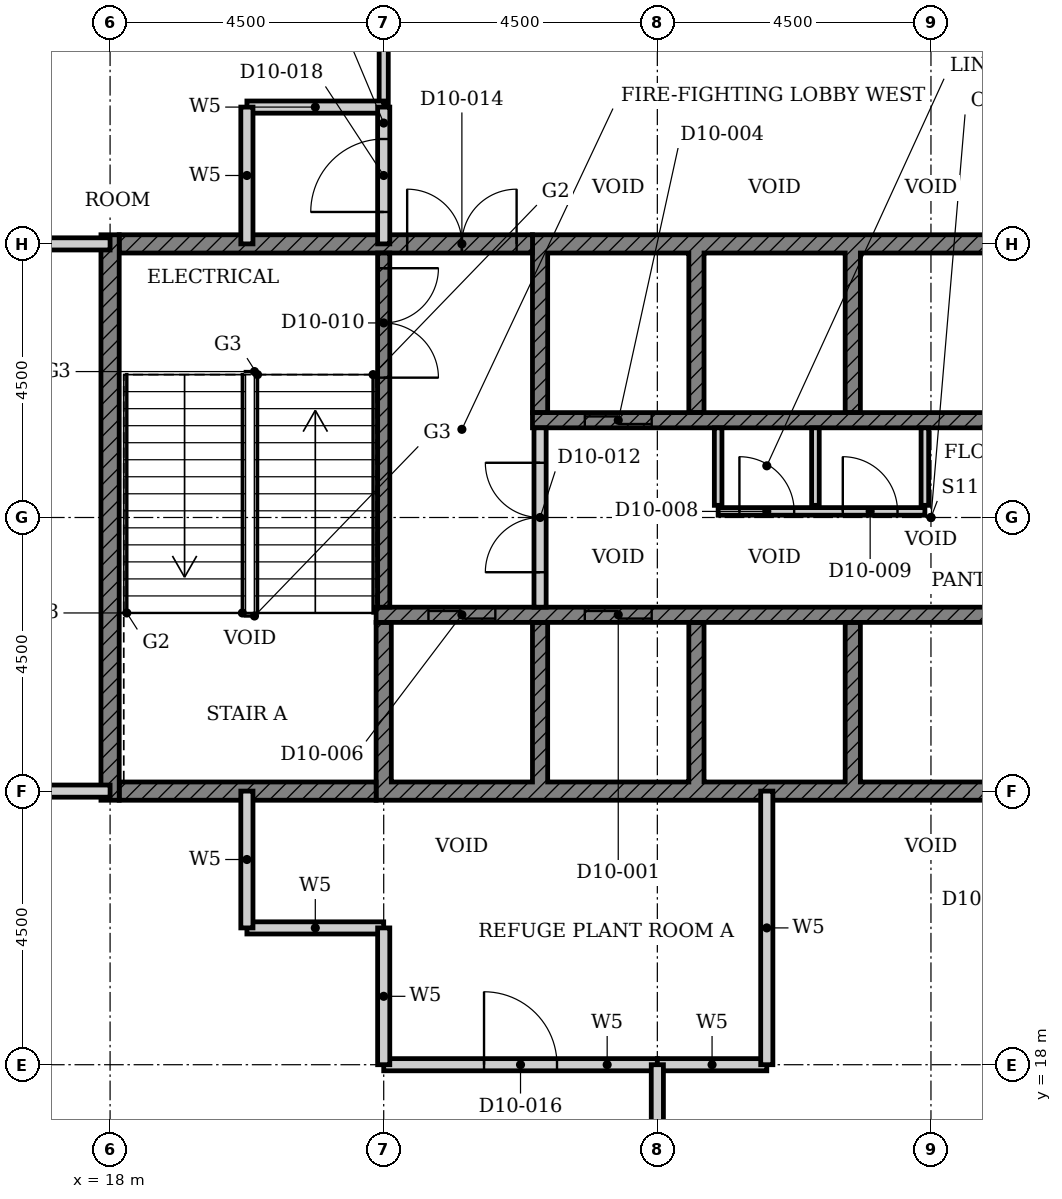
"""IFC4 building model, lengths in metres.
Left out: names, types, materials, properties, quantities, classifications, styles, units other than length and angle.
Written with IfcOpenShell. Run it as: python <this file> out.ifc"""

import sys

from ifc_helpers import new_model, si_unit, direction, frame, frame_2d, origin, place, context, subcontext, project, spatial, polyline, rectangle, outline, extrude, element, fill, save


model = new_model("IFC4")
c1 = context("Model", 3, precision=1e-05, world=origin(), true_north=direction((0.0, 1.0)))
c2 = subcontext(c1, "Body", "Model", "MODEL_VIEW")
j1 = project(units=[si_unit("LENGTHUNIT", "METRE"), si_unit("PLANEANGLEUNIT", "RADIAN")], contexts=[c1])
p1 = place(None, origin())
s1 = spatial("IfcSite", under=j1, at=p1, CompositionType="ELEMENT")
p2 = place(p1, origin())
s2 = spatial("IfcBuilding", under=s1, at=p2, CompositionType="ELEMENT")
p3 = place(p2, frame((0.0, 0.0, 48.0)))
s3 = spatial("IfcBuildingStorey", under=s2, at=p3, CompositionType="ELEMENT", Elevation=48.0)
p4 = place(p3, origin())
e1 = element("IfcWall", 1, at=p4, inside=s3, PredefinedType="SHEAR", context=c2, shape_type="SweptSolid", body=[
    extrude(outline(polyline([(22.375, 22.35), (38.053, 22.35), (38.053, 25.275), (37.803, 25.275), (37.803, 22.65), (35.482, 22.65), (35.482, 25.275), (35.232, 25.275), (35.232, 22.65), (32.911, 22.65), (32.911, 25.275), (32.661, 25.275), (32.661, 22.65), (30.339, 22.65), (30.339, 25.275), (30.089, 25.275), (30.089, 22.65), (27.768, 22.65), (27.768, 25.275), (27.518, 25.275), (27.518, 22.65), (25.197, 22.65), (25.197, 25.275), (24.947, 25.275), (24.947, 22.65), (22.625, 22.65), (22.625, 25.275), (22.375, 25.275), (22.375, 22.35)])), origin(), (0.0, 0.0, 1.0), 4.5),
])
p5 = place(p3, origin())
e2 = element("IfcWall", 2, at=p5, inside=s3, PredefinedType="SHEAR", context=c2, shape_type="SweptSolid", body=[
    extrude(outline(polyline([(24.947, 28.725), (25.197, 28.725), (25.197, 31.35), (27.518, 31.35), (27.518, 28.725), (27.768, 28.725), (27.768, 31.35), (30.089, 31.35), (30.089, 28.725), (30.339, 28.725), (30.339, 31.35), (32.661, 31.35), (32.661, 28.725), (32.911, 28.725), (32.911, 31.35), (35.232, 31.35), (35.232, 28.725), (35.482, 28.725), (35.482, 31.35), (37.803, 31.35), (37.803, 28.725), (38.053, 28.725), (38.053, 31.35), (40.375, 31.35), (40.375, 28.725), (40.625, 28.725), (40.625, 31.65), (24.947, 31.65), (24.947, 28.725)])), origin(), (0.0, 0.0, 1.0), 4.5),
])
p6 = place(p3, frame((18.15, 22.5, 0.0), z_axis=(0.0, 0.0, 1.0), x_axis=(1.0, 0.0, 0.0)))
e3 = element("IfcWall", 3, at=p6, inside=s3, PredefinedType="SHEAR", context=c2, shape_type="SweptSolid", body=[
    extrude(rectangle(XDim=4.225, YDim=0.3, at=frame_2d((2.113, 0.0))), origin(), (0.0, 0.0, 1.0), 4.5),
])
p7 = place(p3, frame((18.15, 31.5, 0.0), z_axis=(0.0, 0.0, 1.0), x_axis=(1.0, 0.0, 0.0)))
e4 = element("IfcWall", 4, at=p7, inside=s3, PredefinedType="SHEAR", context=c2, shape_type="SweptSolid", body=[
    extrude(rectangle(XDim=6.797, YDim=0.3, at=frame_2d((3.398, 0.0))), origin(), (0.0, 0.0, 1.0), 4.5),
])
p8 = place(p7, frame((4.736, 0.0, 0.0)))
e5 = element("IfcOpeningElement", 5, at=p8, cuts=e4, PredefinedType="OPENING", context=c2, shape_type="SweptSolid", body=[
    extrude(rectangle(XDim=1.8, YDim=2.1, at=frame_2d((0.9, 1.05))), frame((0.0, 0.16, 0.0), z_axis=(0.0, -1.0, 0.0), x_axis=(1.0, 0.0, 0.0)), (0.0, 0.0, 1.0), 0.32),
])
p9 = place(p3, frame((18.0, 22.35, 0.0), z_axis=(0.0, 0.0, 1.0), x_axis=(0.0, 1.0, 0.0)))
e6 = element("IfcWall", 6, at=p9, inside=s3, PredefinedType="SHEAR", context=c2, shape_type="SweptSolid", body=[
    extrude(rectangle(XDim=9.3, YDim=0.3, at=frame_2d((4.65, 0.0))), origin(), (0.0, 0.0, 1.0), 4.5),
])
p10 = place(p3, frame((22.375, 25.4, 0.0), z_axis=(0.0, 0.0, 1.0), x_axis=(1.0, 0.0, 0.0)))
e7 = element("IfcWall", 7, at=p10, inside=s3, PredefinedType="SHEAR", context=c2, shape_type="SweptSolid", body=[
    extrude(rectangle(XDim=15.678, YDim=0.25, at=frame_2d((7.839, 0.0))), origin(), (0.0, 0.0, 1.0), 4.5),
])
p11 = place(p10, frame((3.432, 0.0, 0.0)))
e8 = element("IfcOpeningElement", 8, at=p11, cuts=e7, PredefinedType="OPENING", context=c2, shape_type="SweptSolid", body=[
    extrude(rectangle(XDim=1.1, YDim=2.1, at=frame_2d((0.55, 1.05))), frame((0.0, 0.135, 0.0), z_axis=(0.0, -1.0, 0.0), x_axis=(1.0, 0.0, 0.0)), (0.0, 0.0, 1.0), 0.27),
])
p12 = place(p10, frame((11.146, 0.0, 0.0)))
e9 = element("IfcOpeningElement", 9, at=p12, cuts=e7, PredefinedType="OPENING", context=c2, shape_type="SweptSolid", body=[
    extrude(rectangle(XDim=1.1, YDim=2.1, at=frame_2d((0.55, 1.05))), frame((0.0, 0.135, 0.0), z_axis=(0.0, -1.0, 0.0), x_axis=(1.0, 0.0, 0.0)), (0.0, 0.0, 1.0), 0.27),
])
p13 = place(p10, frame((13.718, 0.0, 0.0)))
e10 = element("IfcOpeningElement", 10, at=p13, cuts=e7, PredefinedType="OPENING", context=c2, shape_type="SweptSolid", body=[
    extrude(rectangle(XDim=1.1, YDim=2.1, at=frame_2d((0.55, 1.05))), frame((0.0, 0.135, 0.0), z_axis=(0.0, -1.0, 0.0), x_axis=(1.0, 0.0, 0.0)), (0.0, 0.0, 1.0), 0.27),
])
p14 = place(p10, frame((0.861, 0.0, 0.0)))
e11 = element("IfcOpeningElement", 11, at=p14, cuts=e7, PredefinedType="OPENING", context=c2, shape_type="SweptSolid", body=[
    extrude(rectangle(XDim=1.1, YDim=2.1, at=frame_2d((0.55, 1.05))), frame((0.0, 0.135, 0.0), z_axis=(0.0, -1.0, 0.0), x_axis=(1.0, 0.0, 0.0)), (0.0, 0.0, 1.0), 0.27),
])
p15 = place(p3, frame((24.947, 28.6, 0.0), z_axis=(0.0, 0.0, 1.0), x_axis=(1.0, 0.0, 0.0)))
e12 = element("IfcWall", 12, at=p15, inside=s3, PredefinedType="SHEAR", context=c2, shape_type="SweptSolid", body=[
    extrude(rectangle(XDim=15.678, YDim=0.25, at=frame_2d((7.839, 0.0))), origin(), (0.0, 0.0, 1.0), 4.5),
])
p16 = place(p15, frame((0.861, 0.0, 0.0)))
e13 = element("IfcOpeningElement", 13, at=p16, cuts=e12, PredefinedType="OPENING", context=c2, shape_type="SweptSolid", body=[
    extrude(rectangle(XDim=1.1, YDim=2.1, at=frame_2d((0.55, 1.05))), frame((0.0, 0.135, 0.0), z_axis=(0.0, -1.0, 0.0), x_axis=(1.0, 0.0, 0.0)), (0.0, 0.0, 1.0), 0.27),
])
p17 = place(p15, frame((8.575, 0.0, 0.0)))
e14 = element("IfcOpeningElement", 14, at=p17, cuts=e12, PredefinedType="OPENING", context=c2, shape_type="SweptSolid", body=[
    extrude(rectangle(XDim=1.1, YDim=2.1, at=frame_2d((0.55, 1.05))), frame((0.0, 0.135, 0.0), z_axis=(0.0, -1.0, 0.0), x_axis=(1.0, 0.0, 0.0)), (0.0, 0.0, 1.0), 0.27),
])
p18 = place(p15, frame((13.718, 0.0, 0.0)))
e15 = element("IfcOpeningElement", 15, at=p18, cuts=e12, PredefinedType="OPENING", context=c2, shape_type="SweptSolid", body=[
    extrude(rectangle(XDim=1.1, YDim=2.1, at=frame_2d((0.55, 1.05))), frame((0.0, 0.135, 0.0), z_axis=(0.0, -1.0, 0.0), x_axis=(1.0, 0.0, 0.0)), (0.0, 0.0, 1.0), 0.27),
])
p19 = place(p3, frame((28.0, 27.1, 0.0), z_axis=(0.0, 0.0, 1.0), x_axis=(1.0, 0.0, 0.0)))
e16 = element("IfcWall", 16, at=p19, inside=s3, PredefinedType="PARTITIONING", context=c2, shape_type="SweptSolid", body=[
    extrude(rectangle(XDim=3.4, YDim=0.125, at=frame_2d((1.7, 0.0))), origin(), (0.0, 0.0, 1.0), 4.5),
])
p20 = place(p19, frame((0.35, 0.0, 0.0)))
e17 = element("IfcOpeningElement", 17, at=p20, cuts=e16, PredefinedType="OPENING", context=c2, shape_type="SweptSolid", body=[
    extrude(rectangle(XDim=0.9, YDim=2.1, at=frame_2d((0.45, 1.05))), frame((0.0, 0.073, 0.0), z_axis=(0.0, -1.0, 0.0), x_axis=(1.0, 0.0, 0.0)), (0.0, 0.0, 1.0), 0.145),
])
p21 = place(p19, frame((2.05, 0.0, 0.0)))
e18 = element("IfcOpeningElement", 18, at=p21, cuts=e16, PredefinedType="OPENING", context=c2, shape_type="SweptSolid", body=[
    extrude(rectangle(XDim=0.9, YDim=2.1, at=frame_2d((0.45, 1.05))), frame((0.0, 0.073, 0.0), z_axis=(0.0, -1.0, 0.0), x_axis=(1.0, 0.0, 0.0)), (0.0, 0.0, 1.0), 0.145),
])
for number, where, z_axis, x_axis in (
    (19, (28.0, 28.475, 0.0), (0.0, 0.0, 1.0), (0.0, -1.0, 0.0)),
    (20, (29.6, 28.475, 0.0), (0.0, 0.0, 1.0), (0.0, -1.0, 0.0)),
    (21, (31.4, 28.475, 0.0), (0.0, 0.0, 1.0), (0.0, -1.0, 0.0)),
):
    element("IfcWall", number, at=place(p3, frame(where, z_axis=z_axis, x_axis=x_axis)), inside=s3, PredefinedType="PARTITIONING", context=c2, shape_type="SweptSolid", body=[
        extrude(rectangle(XDim=1.275, YDim=0.125, at=frame_2d((0.638, 0.0))), origin(), (0.0, 0.0, 1.0), 4.5),
    ])
p22 = place(p3, frame((22.5, 31.35, 0.0), z_axis=(0.0, 0.0, 1.0), x_axis=(0.0, -1.0, 0.0)))
e22 = element("IfcWall", 22, at=p22, inside=s3, PredefinedType="SHEAR", context=c2, shape_type="SweptSolid", body=[
    extrude(rectangle(XDim=5.825, YDim=0.2, at=frame_2d((2.913, 0.0))), origin(), (0.0, 0.0, 1.0), 4.5),
])
p23 = place(p22, frame((0.25, 0.0, 0.0)))
e23 = element("IfcOpeningElement", 23, at=p23, cuts=e22, PredefinedType="OPENING", context=c2, shape_type="SweptSolid", body=[
    extrude(rectangle(XDim=1.8, YDim=2.1, at=frame_2d((0.9, 1.05))), frame((0.0, 0.11, 0.0), z_axis=(0.0, -1.0, 0.0), x_axis=(1.0, 0.0, 0.0)), (0.0, 0.0, 1.0), 0.22),
])
p24 = place(p3, frame((25.072, 25.525, 0.0), z_axis=(0.0, 0.0, 1.0), x_axis=(0.0, 1.0, 0.0)))
e24 = element("IfcWall", 24, at=p24, inside=s3, PredefinedType="PARTITIONING", context=c2, shape_type="SweptSolid", body=[
    extrude(rectangle(XDim=2.95, YDim=0.2, at=frame_2d((1.475, 0.0))), origin(), (0.0, 0.0, 1.0), 4.5),
])
p25 = place(p24, frame((0.575, 0.0, 0.0)))
e25 = element("IfcOpeningElement", 25, at=p25, cuts=e24, PredefinedType="OPENING", context=c2, shape_type="SweptSolid", body=[
    extrude(rectangle(XDim=1.8, YDim=2.1, at=frame_2d((0.9, 1.05))), frame((0.0, 0.11, 0.0), z_axis=(0.0, -1.0, 0.0), x_axis=(1.0, 0.0, 0.0)), (0.0, 0.0, 1.0), 0.22),
])
p26 = place(p3, frame((22.5, 33.75, 0.0), z_axis=(0.0, 0.0, 1.0), x_axis=(0.0, 1.0, 0.0)))
e26 = element("IfcWall", 26, at=p26, inside=s3, PredefinedType="PARTITIONING", context=c2, shape_type="SweptSolid", body=[
    extrude(rectangle(XDim=2.25, YDim=0.15, at=frame_2d((1.125, 0.0))), origin(), (0.0, 0.0, 1.0), 4.5),
])
p27 = place(p3, frame((22.5, 18.0, 0.0), z_axis=(0.0, 0.0, 1.0), x_axis=(1.0, 0.0, 0.0)))
e27 = element("IfcWall", 27, at=p27, inside=s3, PredefinedType="PARTITIONING", context=c2, shape_type="SweptSolid", body=[
    extrude(rectangle(XDim=4.5, YDim=0.2, at=frame_2d((2.25, 0.0))), origin(), (0.0, 0.0, 1.0), 4.5),
])
p28 = place(p27, frame((1.65, 0.0, 0.0)))
e28 = element("IfcOpeningElement", 28, at=p28, cuts=e27, PredefinedType="OPENING", context=c2, shape_type="SweptSolid", body=[
    extrude(rectangle(XDim=1.2, YDim=2.1, at=frame_2d((0.6, 1.05))), frame((0.0, 0.11, 0.0), z_axis=(0.0, -1.0, 0.0), x_axis=(1.0, 0.0, 0.0)), (0.0, 0.0, 1.0), 0.22),
])
p29 = place(p3, frame((27.0, 18.0, 0.0), z_axis=(0.0, 0.0, 1.0), x_axis=(1.0, 0.0, 0.0)))
e29 = element("IfcWall", 29, at=p29, inside=s3, PredefinedType="PARTITIONING", context=c2, shape_type="SweptSolid", body=[
    extrude(rectangle(XDim=1.8, YDim=0.2, at=frame_2d((0.9, 0.0))), origin(), (0.0, 0.0, 1.0), 4.5),
])
p30 = place(p3, frame((20.25, 20.25, 0.0), z_axis=(0.0, 0.0, 1.0), x_axis=(1.0, 0.0, 0.0)))
e30 = element("IfcWall", 30, at=p30, inside=s3, PredefinedType="PARTITIONING", context=c2, shape_type="SweptSolid", body=[
    extrude(rectangle(XDim=2.25, YDim=0.2, at=frame_2d((1.125, 0.0))), origin(), (0.0, 0.0, 1.0), 4.5),
])
p31 = place(p3, frame((9.0, 22.5, 0.0), z_axis=(0.0, 0.0, 1.0), x_axis=(1.0, 0.0, 0.0)))
e31 = element("IfcWall", 31, at=p31, inside=s3, PredefinedType="PARTITIONING", context=c2, shape_type="SweptSolid", body=[
    extrude(rectangle(XDim=9.0, YDim=0.2, at=frame_2d((4.5, 0.0))), origin(), (0.0, 0.0, 1.0), 3.78),
])
p32 = place(p31, frame((3.9, 0.0, 0.0)))
e32 = element("IfcOpeningElement", 32, at=p32, cuts=e31, PredefinedType="OPENING", context=c2, shape_type="SweptSolid", body=[
    extrude(rectangle(XDim=1.2, YDim=2.1, at=frame_2d((0.6, 1.05))), frame((0.0, 0.11, 0.0), z_axis=(0.0, -1.0, 0.0), x_axis=(1.0, 0.0, 0.0)), (0.0, 0.0, 1.0), 0.22),
])
p33 = place(p3, frame((9.0, 31.5, 0.0), z_axis=(0.0, 0.0, 1.0), x_axis=(1.0, 0.0, 0.0)))
e33 = element("IfcWall", 33, at=p33, inside=s3, PredefinedType="PARTITIONING", context=c2, shape_type="SweptSolid", body=[
    extrude(rectangle(XDim=9.0, YDim=0.2, at=frame_2d((4.5, 0.0))), origin(), (0.0, 0.0, 1.0), 3.78),
])
for number, where, z_axis, x_axis in (
    (34, (20.25, 33.75, 0.0), (0.0, 0.0, 1.0), (1.0, 0.0, 0.0)),
    (35, (20.25, 20.25, 0.0), (0.0, 0.0, 1.0), (0.0, 1.0, 0.0)),
    (36, (20.25, 31.5, 0.0), (0.0, 0.0, 1.0), (0.0, 1.0, 0.0)),
    (37, (22.5, 18.0, 0.0), (0.0, 0.0, 1.0), (0.0, 1.0, 0.0)),
):
    element("IfcWall", number, at=place(p3, frame(where, z_axis=z_axis, x_axis=x_axis)), inside=s3, PredefinedType="PARTITIONING", context=c2, shape_type="SweptSolid", body=[
        extrude(rectangle(XDim=2.25, YDim=0.2, at=frame_2d((1.125, 0.0))), origin(), (0.0, 0.0, 1.0), 4.5),
    ])
p34 = place(p3, frame((22.5, 31.5, 0.0), z_axis=(0.0, 0.0, 1.0), x_axis=(0.0, 1.0, 0.0)))
e38 = element("IfcWall", 38, at=p34, inside=s3, PredefinedType="PARTITIONING", context=c2, shape_type="SweptSolid", body=[
    extrude(rectangle(XDim=2.25, YDim=0.2, at=frame_2d((1.125, 0.0))), origin(), (0.0, 0.0, 1.0), 4.5),
])
p35 = place(p34, frame((0.525, 0.0, 0.0)))
e39 = element("IfcOpeningElement", 39, at=p35, cuts=e38, PredefinedType="OPENING", context=c2, shape_type="SweptSolid", body=[
    extrude(rectangle(XDim=1.2, YDim=2.1, at=frame_2d((0.6, 1.05))), frame((0.0, 0.11, 0.0), z_axis=(0.0, -1.0, 0.0), x_axis=(1.0, 0.0, 0.0)), (0.0, 0.0, 1.0), 0.22),
])
p36 = place(p3, frame((27.0, 9.0, 0.0), z_axis=(0.0, 0.0, 1.0), x_axis=(0.0, 1.0, 0.0)))
e40 = element("IfcWall", 40, at=p36, inside=s3, PredefinedType="PARTITIONING", context=c2, shape_type="SweptSolid", body=[
    extrude(rectangle(XDim=9.0, YDim=0.2, at=frame_2d((4.5, 0.0))), origin(), (0.0, 0.0, 1.0), 3.78),
])
p37 = place(p36, frame((3.9, 0.0, 0.0)))
e41 = element("IfcOpeningElement", 41, at=p37, cuts=e40, PredefinedType="OPENING", context=c2, shape_type="SweptSolid", body=[
    extrude(rectangle(XDim=1.2, YDim=2.1, at=frame_2d((0.6, 1.05))), frame((0.0, 0.11, 0.0), z_axis=(0.0, -1.0, 0.0), x_axis=(1.0, 0.0, 0.0)), (0.0, 0.0, 1.0), 0.22),
])
p38 = place(p3, frame((28.8, 18.0, 0.0), z_axis=(0.0, 0.0, 1.0), x_axis=(0.0, 1.0, 0.0)))
e42 = element("IfcWall", 42, at=p38, inside=s3, PredefinedType="PARTITIONING", context=c2, shape_type="SweptSolid", body=[
    extrude(rectangle(XDim=4.5, YDim=0.2, at=frame_2d((2.25, 0.0))), origin(), (0.0, 0.0, 1.0), 4.5),
])
p39 = place(p11, origin())
e43 = element("IfcDoor", 43, at=p39, inside=s3, OperationType="DOUBLE_DOOR_SLIDING", PredefinedType="DOOR", context=c2, shape_type="SweptSolid", body=[
    extrude(rectangle(XDim=1.1, YDim=2.1, at=frame_2d((0.55, 1.05))), frame((0.0, 0.025, 0.0), z_axis=(0.0, -1.0, 0.0), x_axis=(1.0, 0.0, 0.0)), (0.0, 0.0, 1.0), 0.05),
])
fill(e8, e43)
p40 = place(p16, origin())
e44 = element("IfcDoor", 44, at=p40, inside=s3, OperationType="DOUBLE_DOOR_SLIDING", PredefinedType="DOOR", context=c2, shape_type="SweptSolid", body=[
    extrude(rectangle(XDim=1.1, YDim=2.1, at=frame_2d((0.55, 1.05))), frame((0.0, 0.025, 0.0), z_axis=(0.0, -1.0, 0.0), x_axis=(1.0, 0.0, 0.0)), (0.0, 0.0, 1.0), 0.05),
])
fill(e13, e44)
p41 = place(p14, origin())
e45 = element("IfcDoor", 45, at=p41, inside=s3, OperationType="DOUBLE_DOOR_SLIDING", PredefinedType="DOOR", context=c2, shape_type="SweptSolid", body=[
    extrude(rectangle(XDim=1.1, YDim=2.1, at=frame_2d((0.55, 1.05))), frame((0.0, 0.025, 0.0), z_axis=(0.0, -1.0, 0.0), x_axis=(1.0, 0.0, 0.0)), (0.0, 0.0, 1.0), 0.05),
])
fill(e11, e45)
p42 = place(p20, origin())
e46 = element("IfcDoor", 46, at=p42, inside=s3, OperationType="SINGLE_SWING_LEFT", PredefinedType="DOOR", context=c2, shape_type="SweptSolid", body=[
    extrude(rectangle(XDim=0.9, YDim=2.1, at=frame_2d((0.45, 1.05))), frame((0.0, 0.025, 0.0), z_axis=(0.0, -1.0, 0.0), x_axis=(1.0, 0.0, 0.0)), (0.0, 0.0, 1.0), 0.05),
])
fill(e17, e46)
p43 = place(p21, origin())
e47 = element("IfcDoor", 47, at=p43, inside=s3, OperationType="SINGLE_SWING_LEFT", PredefinedType="DOOR", context=c2, shape_type="SweptSolid", body=[
    extrude(rectangle(XDim=0.9, YDim=2.1, at=frame_2d((0.45, 1.05))), frame((0.0, 0.025, 0.0), z_axis=(0.0, -1.0, 0.0), x_axis=(1.0, 0.0, 0.0)), (0.0, 0.0, 1.0), 0.05),
])
fill(e18, e47)
p44 = place(p23, origin())
e48 = element("IfcDoor", 48, at=p44, inside=s3, OperationType="DOUBLE_DOOR_SINGLE_SWING", PredefinedType="DOOR", context=c2, shape_type="SweptSolid", body=[
    extrude(rectangle(XDim=1.8, YDim=2.1, at=frame_2d((0.9, 1.05))), frame((0.0, 0.025, 0.0), z_axis=(0.0, -1.0, 0.0), x_axis=(1.0, 0.0, 0.0)), (0.0, 0.0, 1.0), 0.05),
])
fill(e23, e48)
p45 = place(p25, origin())
e49 = element("IfcDoor", 49, at=p45, inside=s3, OperationType="DOUBLE_DOOR_SINGLE_SWING", PredefinedType="DOOR", context=c2, shape_type="SweptSolid", body=[
    extrude(rectangle(XDim=1.8, YDim=2.1, at=frame_2d((0.9, 1.05))), frame((0.0, 0.025, 0.0), z_axis=(0.0, -1.0, 0.0), x_axis=(1.0, 0.0, 0.0)), (0.0, 0.0, 1.0), 0.05),
])
fill(e25, e49)
p46 = place(p8, origin())
e50 = element("IfcDoor", 50, at=p46, inside=s3, OperationType="DOUBLE_DOOR_SINGLE_SWING", PredefinedType="DOOR", context=c2, shape_type="SweptSolid", body=[
    extrude(rectangle(XDim=1.8, YDim=2.1, at=frame_2d((0.9, 1.05))), frame((0.0, 0.025, 0.0), z_axis=(0.0, -1.0, 0.0), x_axis=(1.0, 0.0, 0.0)), (0.0, 0.0, 1.0), 0.05),
])
fill(e5, e50)
p47 = place(p28, origin())
e51 = element("IfcDoor", 51, at=p47, inside=s3, OperationType="SINGLE_SWING_RIGHT", PredefinedType="DOOR", context=c2, shape_type="SweptSolid", body=[
    extrude(rectangle(XDim=1.2, YDim=2.1, at=frame_2d((0.6, 1.05))), frame((0.0, 0.025, 0.0), z_axis=(0.0, -1.0, 0.0), x_axis=(1.0, 0.0, 0.0)), (0.0, 0.0, 1.0), 0.05),
])
fill(e28, e51)
p48 = place(p35, origin())
e52 = element("IfcDoor", 52, at=p48, inside=s3, OperationType="SINGLE_SWING_RIGHT", PredefinedType="DOOR", context=c2, shape_type="SweptSolid", body=[
    extrude(rectangle(XDim=1.2, YDim=2.1, at=frame_2d((0.6, 1.05))), frame((0.0, 0.025, 0.0), z_axis=(0.0, -1.0, 0.0), x_axis=(1.0, 0.0, 0.0)), (0.0, 0.0, 1.0), 0.05),
])
fill(e39, e52)
save(model, sys.argv[1])
